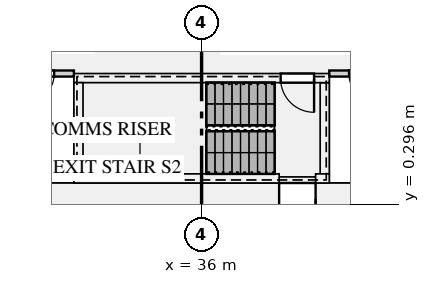
"""IFC4 building model, lengths in metres.
Left out: names, types, materials, properties, quantities, classifications, styles, units other than length and angle.
Written with IfcOpenShell. Run it as: python <this file> out.ifc"""

import sys

from ifc_helpers import new_model, si_unit, direction, frame, frame_2d, origin, place, context, subcontext, project, spatial, rectangle, extrude, element, fill, save


model = new_model("IFC4")
c1 = context("Model", 3, precision=1e-05, world=origin(), true_north=direction((0.0, 1.0)))
c2 = subcontext(c1, "Body", "Model", "MODEL_VIEW")
j1 = project(units=[si_unit("LENGTHUNIT", "METRE"), si_unit("PLANEANGLEUNIT", "RADIAN")], contexts=[c1])
p1 = place(None, origin())
s1 = spatial("IfcSite", under=j1, at=p1, CompositionType="ELEMENT")
p2 = place(p1, origin())
s2 = spatial("IfcBuilding", under=s1, at=p2, CompositionType="ELEMENT")
p3 = place(p2, origin())
s3 = spatial("IfcBuildingStorey", under=s2, at=p3, CompositionType="ELEMENT", Elevation=0.0)
p4 = place(p3, frame((19.0, 0.5, 0.0), z_axis=(0.0, 0.0, 1.0), x_axis=(1.0, 0.0, 0.0)))
e1 = element("IfcWall", 1, at=p4, inside=s3, PredefinedType="SHEAR", context=c2, shape_type="SweptSolid", body=[
    extrude(rectangle(XDim=34.0, YDim=1.0, at=frame_2d((17.0, 0.0))), origin(), (0.0, 0.0, 1.0), 6.5),
])
p5 = place(p4, frame((19.55, 0.0, 0.0)))
e2 = element("IfcOpeningElement", 2, at=p5, cuts=e1, PredefinedType="OPENING", context=c2, shape_type="SweptSolid", body=[
    extrude(rectangle(XDim=1.2, YDim=2.1, at=frame_2d((0.6, 1.05))), frame((0.0, 0.51, 0.0), z_axis=(0.0, -1.0, 0.0), x_axis=(1.0, 0.0, 0.0)), (0.0, 0.0, 1.0), 1.02),
])
p6 = place(p3, frame((31.8, 1.15, 0.0), z_axis=(0.0, 0.0, 1.0), x_axis=(1.0, 0.0, 0.0)))
e3 = element("IfcWall", 3, at=p6, inside=s3, PredefinedType="SHEAR", context=c2, shape_type="SweptSolid", body=[
    extrude(rectangle(XDim=6.75, YDim=0.3, at=frame_2d((3.375, 0.0))), origin(), (0.0, 0.0, 1.0), 6.5),
])
p7 = place(p3, frame((39.75, 1.15, 0.0), z_axis=(0.0, 0.0, 1.0), x_axis=(1.0, 0.0, 0.0)))
e4 = element("IfcWall", 4, at=p7, inside=s3, PredefinedType="SHEAR", context=c2, shape_type="SweptSolid", body=[
    extrude(rectangle(XDim=0.45, YDim=0.3, at=frame_2d((0.225, 0.0))), origin(), (0.0, 0.0, 1.0), 6.5),
])
p8 = place(p3, frame((31.8, 4.45, 0.0), z_axis=(0.0, 0.0, 1.0), x_axis=(1.0, 0.0, 0.0)))
e5 = element("IfcWall", 5, at=p8, inside=s3, PredefinedType="SHEAR", context=c2, shape_type="SweptSolid", body=[
    extrude(rectangle(XDim=8.4, YDim=0.3, at=frame_2d((4.2, 0.0))), origin(), (0.0, 0.0, 1.0), 6.5),
])
p9 = place(p8, frame((6.8, 0.0, 0.0)))
e6 = element("IfcOpeningElement", 6, at=p9, cuts=e5, PredefinedType="OPENING", context=c2, shape_type="SweptSolid", body=[
    extrude(rectangle(XDim=1.1, YDim=2.1, at=frame_2d((0.55, 1.05))), frame((0.0, 0.16, 0.0), z_axis=(0.0, -1.0, 0.0), x_axis=(1.0, 0.0, 0.0)), (0.0, 0.0, 1.0), 0.32),
])
for number, where, z_axis, x_axis in (
    (7, (31.95, 1.3, 0.0), (0.0, 0.0, 1.0), (0.0, 1.0, 0.0)),
    (8, (40.05, 1.3, 0.0), (0.0, 0.0, 1.0), (0.0, 1.0, 0.0)),
):
    element("IfcWall", number, at=place(p3, frame(where, z_axis=z_axis, x_axis=x_axis)), inside=s3, PredefinedType="SHEAR", context=c2, shape_type="SweptSolid", body=[
        extrude(rectangle(XDim=3.0, YDim=0.3, at=frame_2d((1.5, 0.0))), origin(), (0.0, 0.0, 1.0), 6.5),
    ])
p10 = place(p3, frame((27.3, 4.6, 0.0), z_axis=(0.0, 0.0, 1.0), x_axis=(1.0, 0.0, 0.0)))
e9 = element("IfcWall", 9, at=p10, inside=s3, PredefinedType="PARTITIONING", context=c2, shape_type="SweptSolid", body=[
    extrude(rectangle(XDim=4.5, YDim=0.2, at=frame_2d((2.25, 0.0))), origin(), (0.0, 0.0, 1.0), 6.098),
])
p11 = place(p10, frame((0.75, 0.0, 0.0)))
e10 = element("IfcOpeningElement", 10, at=p11, cuts=e9, PredefinedType="OPENING", context=c2, shape_type="SweptSolid", body=[
    extrude(rectangle(XDim=0.9, YDim=2.1, at=frame_2d((0.45, 1.05))), frame((0.0, 0.11, 0.0), z_axis=(0.0, -1.0, 0.0), x_axis=(1.0, 0.0, 0.0)), (0.0, 0.0, 1.0), 0.22),
])
p12 = place(p10, frame((2.95, 0.0, 0.0)))
e11 = element("IfcOpeningElement", 11, at=p12, cuts=e9, PredefinedType="OPENING", context=c2, shape_type="SweptSolid", body=[
    extrude(rectangle(XDim=0.9, YDim=2.1, at=frame_2d((0.45, 1.05))), frame((0.0, 0.11, 0.0), z_axis=(0.0, -1.0, 0.0), x_axis=(1.0, 0.0, 0.0)), (0.0, 0.0, 1.0), 0.22),
])
p13 = place(p3, frame((40.2, 4.6, 0.0), z_axis=(0.0, 0.0, 1.0), x_axis=(1.0, 0.0, 0.0)))
e12 = element("IfcWall", 12, at=p13, inside=s3, PredefinedType="PARTITIONING", context=c2, shape_type="SweptSolid", body=[
    extrude(rectangle(XDim=4.5, YDim=0.2, at=frame_2d((2.25, 0.0))), origin(), (0.0, 0.0, 1.0), 6.098),
])
p14 = place(p13, frame((0.65, 0.0, 0.0)))
e13 = element("IfcOpeningElement", 13, at=p14, cuts=e12, PredefinedType="OPENING", context=c2, shape_type="SweptSolid", body=[
    extrude(rectangle(XDim=0.9, YDim=2.1, at=frame_2d((0.45, 1.05))), frame((0.0, 0.11, 0.0), z_axis=(0.0, -1.0, 0.0), x_axis=(1.0, 0.0, 0.0)), (0.0, 0.0, 1.0), 0.22),
])
p15 = place(p13, frame((2.85, 0.0, 0.0)))
e14 = element("IfcOpeningElement", 14, at=p15, cuts=e12, PredefinedType="OPENING", context=c2, shape_type="SweptSolid", body=[
    extrude(rectangle(XDim=0.9, YDim=2.1, at=frame_2d((0.45, 1.05))), frame((0.0, 0.11, 0.0), z_axis=(0.0, -1.0, 0.0), x_axis=(1.0, 0.0, 0.0)), (0.0, 0.0, 1.0), 0.22),
])
p16 = place(p9, frame((1.1, 0.0, 0.0), z_axis=(0.0, 0.0, 1.0), x_axis=(-1.0, 0.0, 0.0)))
e15 = element("IfcDoor", 15, at=p16, inside=s3, OperationType="SINGLE_SWING_LEFT", PredefinedType="DOOR", context=c2, shape_type="SweptSolid", body=[
    extrude(rectangle(XDim=1.1, YDim=2.1, at=frame_2d((0.55, 1.05))), frame((0.0, 0.025, 0.0), z_axis=(0.0, -1.0, 0.0), x_axis=(1.0, 0.0, 0.0)), (0.0, 0.0, 1.0), 0.05),
])
fill(e6, e15)
p17 = place(p12, frame((0.9, 0.0, 0.0), z_axis=(0.0, 0.0, 1.0), x_axis=(-1.0, 0.0, 0.0)))
e16 = element("IfcDoor", 16, at=p17, inside=s3, OperationType="SINGLE_SWING_RIGHT", PredefinedType="DOOR", context=c2, shape_type="SweptSolid", body=[
    extrude(rectangle(XDim=0.9, YDim=2.1, at=frame_2d((0.45, 1.05))), frame((0.0, 0.025, 0.0), z_axis=(0.0, -1.0, 0.0), x_axis=(1.0, 0.0, 0.0)), (0.0, 0.0, 1.0), 0.05),
])
fill(e11, e16)
p18 = place(p14, frame((0.9, 0.0, 0.0), z_axis=(0.0, 0.0, 1.0), x_axis=(-1.0, 0.0, 0.0)))
e17 = element("IfcDoor", 17, at=p18, inside=s3, OperationType="SINGLE_SWING_LEFT", PredefinedType="DOOR", context=c2, shape_type="SweptSolid", body=[
    extrude(rectangle(XDim=0.9, YDim=2.1, at=frame_2d((0.45, 1.05))), frame((0.0, 0.025, 0.0), z_axis=(0.0, -1.0, 0.0), x_axis=(1.0, 0.0, 0.0)), (0.0, 0.0, 1.0), 0.05),
])
fill(e13, e17)
p19 = place(p5, frame((1.2, 0.0, 0.0), z_axis=(0.0, 0.0, 1.0), x_axis=(-1.0, 0.0, 0.0)))
e18 = element("IfcDoor", 18, at=p19, inside=s3, OperationType="SINGLE_SWING_LEFT", PredefinedType="DOOR", context=c2, shape_type="SweptSolid", body=[
    extrude(rectangle(XDim=1.2, YDim=2.1, at=frame_2d((0.6, 1.05))), frame((0.0, 0.025, 0.0), z_axis=(0.0, -1.0, 0.0), x_axis=(1.0, 0.0, 0.0)), (0.0, 0.0, 1.0), 0.05),
])
fill(e2, e18)
save(model, sys.argv[1])
